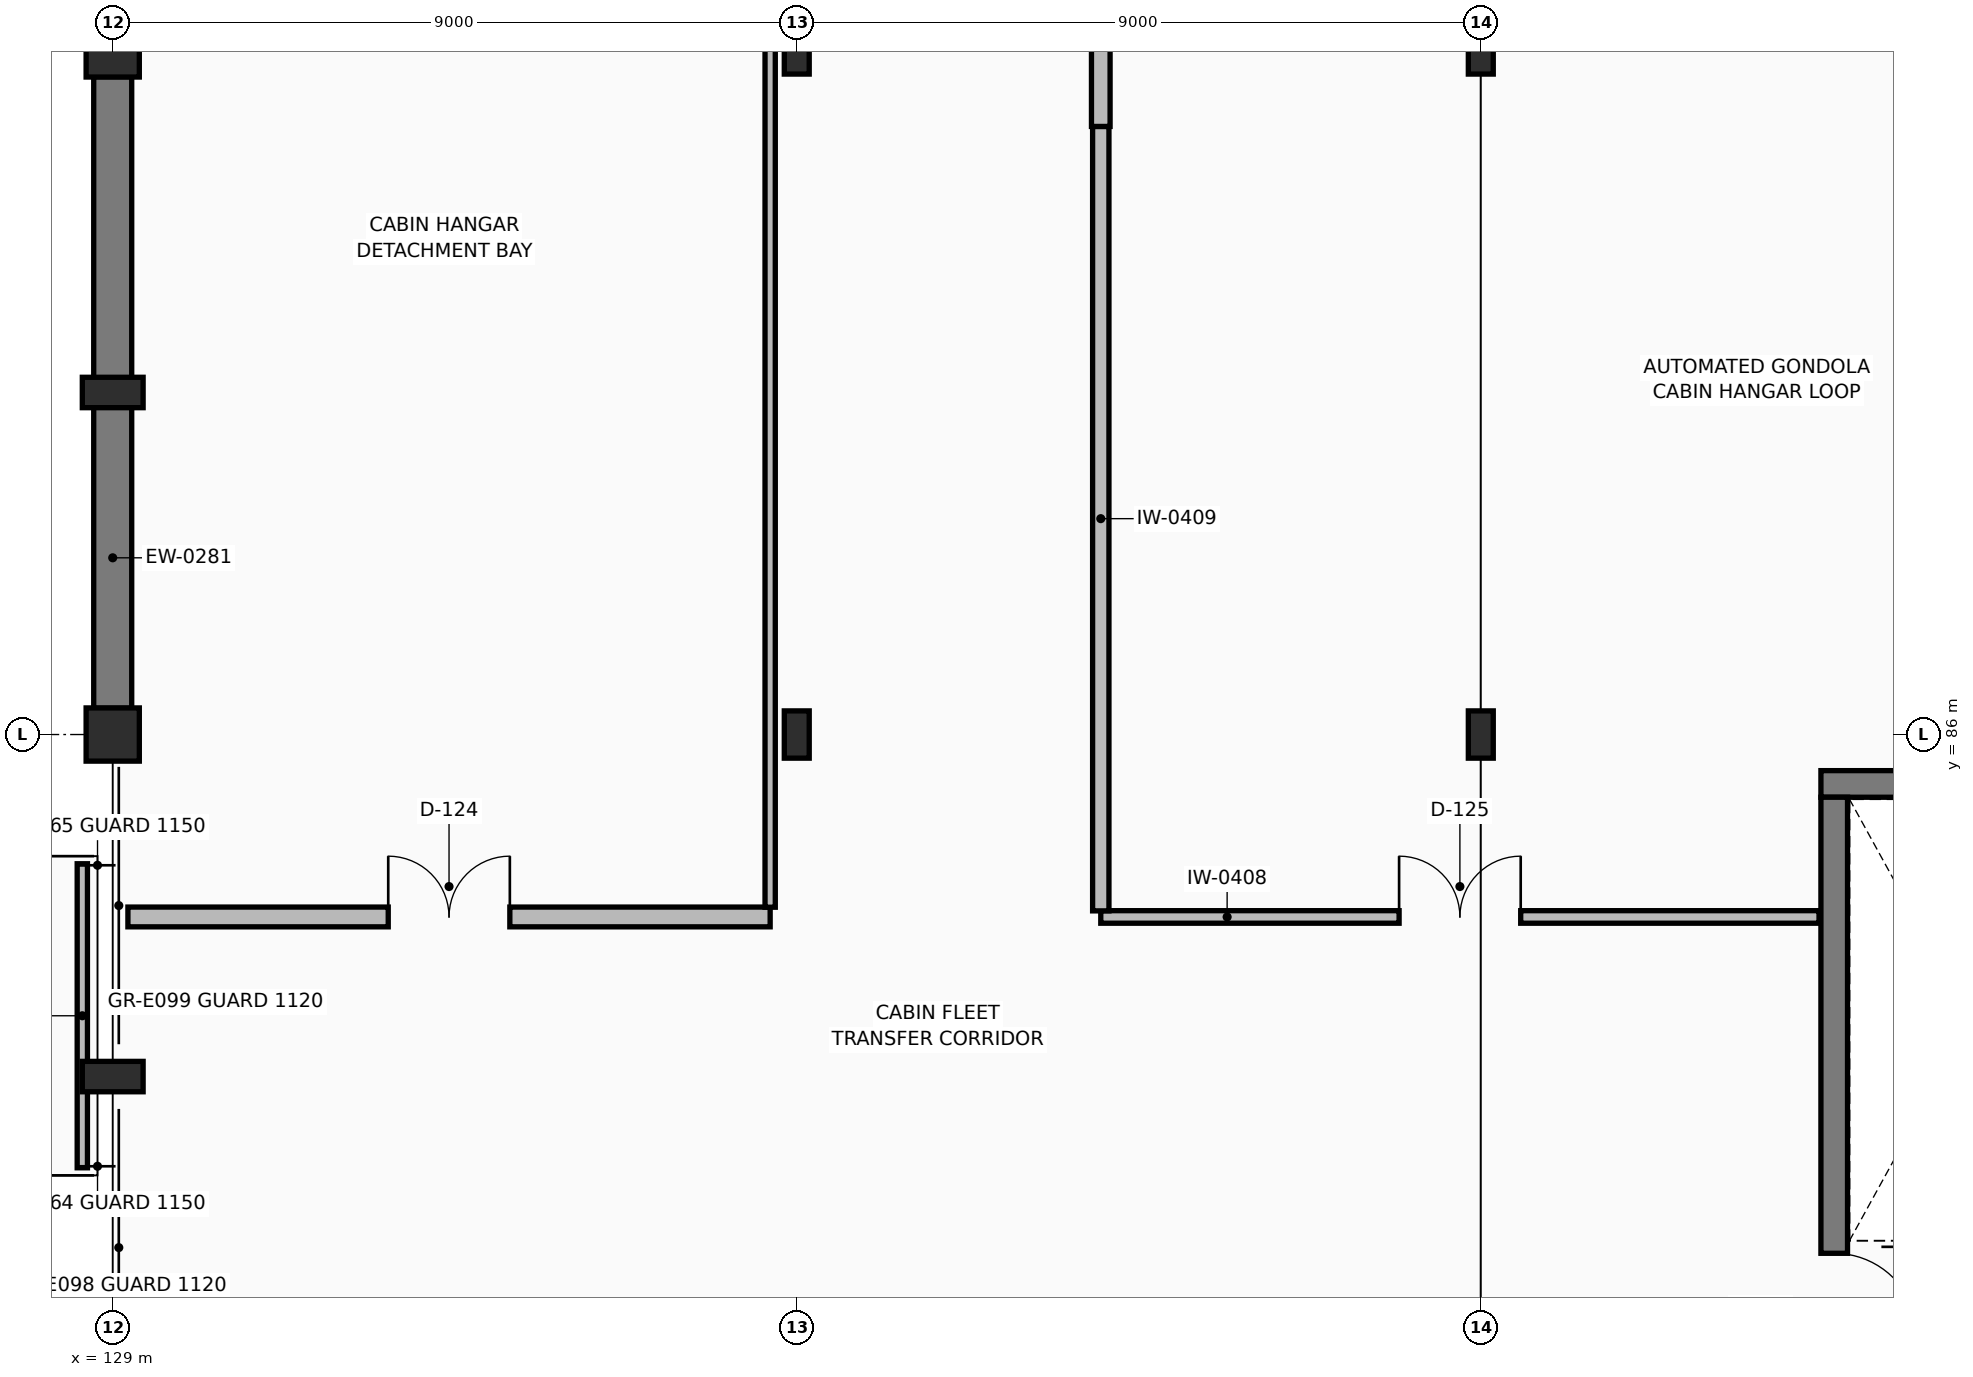
"""IFC4 building model, lengths in metres.
Left out: names, types, materials, properties, quantities, classifications, styles, units other than length and angle.
Written with IfcOpenShell. Run it as: python <this file> out.ifc"""

import sys

from ifc_helpers import new_model, si_unit, direction, frame, frame_2d, origin, origin_2d, place, context, subcontext, project, spatial, rectangle, i_section, extrude, element, fill, save


model = new_model("IFC4")
c1 = context("Model", 3, precision=1e-05, world=origin(), true_north=direction((0.0, 1.0)))
c2 = subcontext(c1, "Body", "Model", "MODEL_VIEW")
j1 = project(units=[si_unit("LENGTHUNIT", "METRE"), si_unit("PLANEANGLEUNIT", "RADIAN")], contexts=[c1])
p1 = place(None, origin())
s1 = spatial("IfcSite", under=j1, at=p1, CompositionType="ELEMENT")
p2 = place(p1, origin())
s2 = spatial("IfcBuilding", under=s1, at=p2, CompositionType="ELEMENT")
p3 = place(p2, frame((0.0, 0.0, 9.6)))
s3 = spatial("IfcBuildingStorey", under=s2, at=p3, CompositionType="ELEMENT", Elevation=9.6)
for number, where, z_axis, x_axis in (
    (1, (129.0, 86.0, 0.0), (0.0, 0.0, 1.0), (1.0, 0.0, 0.0)),
    (2, (129.0, 95.0, 0.0), (0.0, 0.0, 1.0), (1.0, 0.0, 0.0)),
):
    element("IfcColumn", number, at=place(p3, frame(where, z_axis=z_axis, x_axis=x_axis)), inside=s3, PredefinedType="COLUMN", context=c2, shape_type="SweptSolid", body=[
        extrude(rectangle(XDim=0.7, YDim=0.7, at=origin_2d()), origin(), (0.0, 0.0, 1.0), 4.8),
    ])
for number, where, z_axis, x_axis in (
    (3, (138.0, 86.0, 0.0), (0.0, 0.0, 1.0), (1.0, 0.0, 0.0)),
    (4, (138.0, 95.0, 0.0), (0.0, 0.0, 1.0), (1.0, 0.0, 0.0)),
    (5, (147.0, 86.0, 0.0), (0.0, 0.0, 1.0), (1.0, 0.0, 0.0)),
    (6, (147.0, 95.0, 0.0), (0.0, 0.0, 1.0), (1.0, 0.0, 0.0)),
):
    element("IfcColumn", number, at=place(p3, frame(where, z_axis=z_axis, x_axis=x_axis)), inside=s3, PredefinedType="COLUMN", context=c2, shape_type="SweptSolid", body=[
        extrude(i_section(OverallWidth=0.328, OverallDepth=0.622, WebThickness=0.015, FlangeThickness=0.024, at=origin_2d()), origin(), (0.0, 0.0, 1.0), 4.8),
    ])
for number, where, z_axis, x_axis in (
    (7, (129.0, 81.5, 0.0), (0.0, 0.0, 1.0), (0.0, 1.0, 0.0)),
    (8, (129.0, 90.5, 0.0), (0.0, 0.0, 1.0), (0.0, 1.0, 0.0)),
):
    element("IfcColumn", number, at=place(p3, frame(where, z_axis=z_axis, x_axis=x_axis)), inside=s3, PredefinedType="PILASTER", context=c2, shape_type="SweptSolid", body=[
        extrude(rectangle(XDim=0.4, YDim=0.8, at=origin_2d()), origin(), (0.0, 0.0, 1.0), 4.8),
    ])
for number, where, z_axis, x_axis in (
    (9, (129.0, 94.655, 0.0), (0.0, 0.0, 1.0), (0.0, -1.0, 0.0)),
    (10, (129.0, 90.305, 0.0), (0.0, 0.0, 1.0), (0.0, -1.0, 0.0)),
):
    element("IfcWall", number, at=place(p3, frame(where, z_axis=z_axis, x_axis=x_axis)), inside=s3, PredefinedType="SHEAR", context=c2, shape_type="SweptSolid", body=[
        extrude(rectangle(XDim=3.96, YDim=0.5, at=frame_2d((1.98, 0.0))), origin(), (0.0, 0.0, 1.0), 2.752),
    ])
p4 = place(p3, frame((155.425, 85.35, 0.0), z_axis=(0.0, 0.0, 1.0), x_axis=(-1.0, 0.0, 0.0)))
e11 = element("IfcWall", 11, at=p4, inside=s3, PredefinedType="SHEAR", context=c2, shape_type="SweptSolid", body=[
    extrude(rectangle(XDim=3.95, YDim=0.35, at=frame_2d((1.975, 0.0))), origin(), (0.0, 0.0, 1.0), 4.49),
])
p5 = place(p3, frame((151.65, 85.175, 0.0), z_axis=(0.0, 0.0, 1.0), x_axis=(0.0, -1.0, 0.0)))
e12 = element("IfcWall", 12, at=p5, inside=s3, PredefinedType="SHEAR", context=c2, shape_type="SweptSolid", body=[
    extrude(rectangle(XDim=7.45, YDim=0.35, at=frame_2d((3.725, 0.0))), origin(), (0.0, 0.0, 1.0), 4.49),
])
p6 = place(p5, frame((6.0, 0.0, 0.0)))
e13 = element("IfcOpeningElement", 13, at=p6, cuts=e12, PredefinedType="OPENING", context=c2, shape_type="SweptSolid", body=[
    extrude(rectangle(XDim=1.1, YDim=2.2, at=frame_2d((0.55, 1.1))), frame((0.0, 0.185, 0.0), z_axis=(0.0, -1.0, 0.0), x_axis=(1.0, 0.0, 0.0)), (0.0, 0.0, 1.0), 0.37),
])
p7 = place(p3, frame((128.6, 80.3, 0.0), z_axis=(0.0, 0.0, 1.0), x_axis=(0.0, 1.0, 0.0)))
e14 = element("IfcWall", 14, at=p7, inside=s3, PredefinedType="PARTITIONING", context=c2, shape_type="SweptSolid", body=[
    extrude(rectangle(XDim=4.0, YDim=0.135, at=frame_2d((2.0, 0.0))), origin(), (0.0, 0.0, 1.0), 2.742),
])
p8 = place(p3, frame((129.2, 83.6, 0.0), z_axis=(0.0, 0.0, 1.0), x_axis=(1.0, 0.0, 0.0)))
e15 = element("IfcWall", 15, at=p8, inside=s3, PredefinedType="PARTITIONING", context=c2, shape_type="SweptSolid", body=[
    extrude(rectangle(XDim=8.45, YDim=0.26, at=frame_2d((4.225, 0.0))), origin(), (0.0, 0.0, 1.0), 4.435),
])
p9 = place(p8, frame((3.425, 0.0, 0.0)))
e16 = element("IfcOpeningElement", 16, at=p9, cuts=e15, PredefinedType="OPENING", context=c2, shape_type="SweptSolid", body=[
    extrude(rectangle(XDim=1.6, YDim=2.25, at=frame_2d((0.8, 1.125))), frame((0.0, 0.14, 0.0), z_axis=(0.0, -1.0, 0.0), x_axis=(1.0, 0.0, 0.0)), (0.0, 0.0, 1.0), 0.28),
])
p10 = place(p3, frame((137.65, 83.728, 0.0), z_axis=(0.0, 0.0, 1.0), x_axis=(0.0, 1.0, 0.0)))
e17 = element("IfcWall", 17, at=p10, inside=s3, PredefinedType="PARTITIONING", context=c2, shape_type="SweptSolid", body=[
    extrude(rectangle(XDim=13.572, YDim=0.135, at=frame_2d((6.786, 0.0))), origin(), (0.0, 0.0, 1.0), 3.753),
])
p11 = place(p3, frame((142.0, 83.6, 0.0), z_axis=(0.0, 0.0, 1.0), x_axis=(1.0, 0.0, 0.0)))
e18 = element("IfcWall", 18, at=p11, inside=s3, PredefinedType="PARTITIONING", context=c2, shape_type="SweptSolid", body=[
    extrude(rectangle(XDim=9.45, YDim=0.165, at=frame_2d((4.725, 0.0))), origin(), (0.0, 0.0, 1.0), 3.753),
])
p12 = place(p11, frame((3.925, 0.0, 0.0)))
e19 = element("IfcOpeningElement", 19, at=p12, cuts=e18, PredefinedType="OPENING", context=c2, shape_type="SweptSolid", body=[
    extrude(rectangle(XDim=1.6, YDim=2.25, at=frame_2d((0.8, 1.125))), frame((0.0, 0.093, 0.0), z_axis=(0.0, -1.0, 0.0), x_axis=(1.0, 0.0, 0.0)), (0.0, 0.0, 1.0), 0.185),
])
p13 = place(p3, frame((142.0, 83.68, 0.0), z_axis=(0.0, 0.0, 1.0), x_axis=(0.0, 1.0, 0.0)))
e20 = element("IfcWall", 20, at=p13, inside=s3, PredefinedType="PARTITIONING", context=c2, shape_type="SweptSolid", body=[
    extrude(rectangle(XDim=10.32, YDim=0.215, at=frame_2d((5.16, 0.0))), origin(), (0.0, 0.0, 1.0), 3.753),
])
p14 = place(p3, frame((142.0, 94.0, 0.0), z_axis=(0.0, 0.0, 1.0), x_axis=(0.0, 1.0, 0.0)))
e21 = element("IfcWall", 21, at=p14, inside=s3, PredefinedType="PARTITIONING", context=c2, shape_type="SweptSolid", body=[
    extrude(rectangle(XDim=3.8, YDim=0.245, at=frame_2d((1.9, 0.0))), origin(), (0.0, 0.0, 1.0), 3.753),
])
p15 = place(p14, frame((1.3, 0.0, 0.0)))
e22 = element("IfcOpeningElement", 22, at=p15, cuts=e21, PredefinedType="OPENING", context=c2, shape_type="SweptSolid", body=[
    extrude(rectangle(XDim=1.2, YDim=2.2, at=frame_2d((0.6, 1.1))), frame((0.0, 0.133, 0.0), z_axis=(0.0, -1.0, 0.0), x_axis=(1.0, 0.0, 0.0)), (0.0, 0.0, 1.0), 0.265),
])
p16 = place(p6, origin())
e23 = element("IfcDoor", 23, at=p16, inside=s3, OperationType="SINGLE_SWING_RIGHT", PredefinedType="DOOR", context=c2, shape_type="SweptSolid", body=[
    extrude(rectangle(XDim=1.1, YDim=2.2, at=frame_2d((0.55, 1.1))), frame((0.0, 0.025, 0.0), z_axis=(0.0, -1.0, 0.0), x_axis=(1.0, 0.0, 0.0)), (0.0, 0.0, 1.0), 0.05),
])
fill(e13, e23)
p17 = place(p9, origin())
e24 = element("IfcDoor", 24, at=p17, inside=s3, OperationType="DOUBLE_SWING_LEFT", PredefinedType="DOOR", context=c2, shape_type="SweptSolid", body=[
    extrude(rectangle(XDim=1.6, YDim=2.25, at=frame_2d((0.8, 1.125))), frame((0.0, 0.025, 0.0), z_axis=(0.0, -1.0, 0.0), x_axis=(1.0, 0.0, 0.0)), (0.0, 0.0, 1.0), 0.05),
])
fill(e16, e24)
p18 = place(p12, origin())
e25 = element("IfcDoor", 25, at=p18, inside=s3, OperationType="DOUBLE_SWING_RIGHT", PredefinedType="DOOR", context=c2, shape_type="SweptSolid", body=[
    extrude(rectangle(XDim=1.6, YDim=2.25, at=frame_2d((0.8, 1.125))), frame((0.0, 0.025, 0.0), z_axis=(0.0, -1.0, 0.0), x_axis=(1.0, 0.0, 0.0)), (0.0, 0.0, 1.0), 0.05),
])
fill(e19, e25)
save(model, sys.argv[1])
